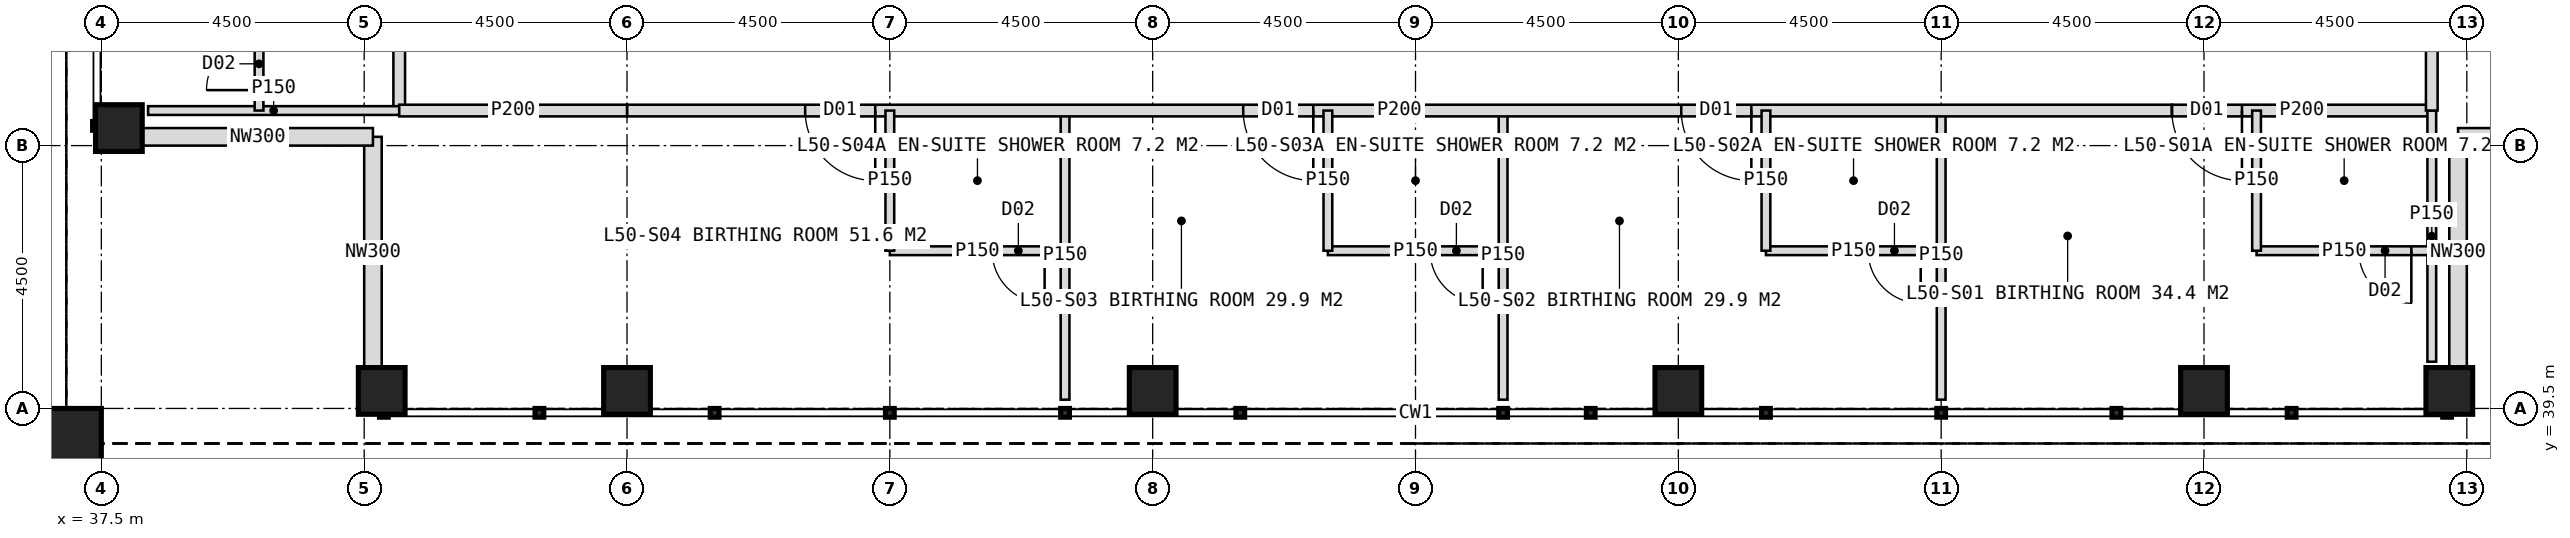
"""IFC4 building model, lengths in metres.
Left out: names, types, materials, properties, quantities, classifications, styles, units other than length and angle.
Written with IfcOpenShell. Run it as: python <this file> out.ifc"""

import sys

from ifc_helpers import new_model, si_unit, direction, frame, frame_2d, origin, origin_2d, place, context, subcontext, project, spatial, rectangle, hollow_rectangle, extrude, element, fill, save


model = new_model("IFC4")
c1 = context("Model", 3, precision=1e-05, world=origin(), true_north=direction((0.0, 1.0)))
c2 = subcontext(c1, "Body", "Model", "MODEL_VIEW")
j1 = project(units=[si_unit("LENGTHUNIT", "METRE"), si_unit("PLANEANGLEUNIT", "RADIAN")], contexts=[c1])
p1 = place(None, origin())
s1 = spatial("IfcSite", under=j1, at=p1, CompositionType="ELEMENT")
p2 = place(p1, origin())
s2 = spatial("IfcBuilding", under=s1, at=p2, CompositionType="ELEMENT")
p3 = place(p2, frame((0.0, 0.0, 209.0)))
s3 = spatial("IfcBuildingStorey", under=s2, at=p3, CompositionType="ELEMENT", Elevation=209.0)
for number, where, z_axis, x_axis in (
    (1, (42.3, 39.8, 0.0), (0.0, 0.0, 1.0), (1.0, 0.0, 0.0)),
    (2, (37.8, 44.3, 0.0), (0.0, 0.0, 1.0), (1.0, 0.0, 0.0)),
    (3, (46.5, 39.8, 0.0), (0.0, 0.0, 1.0), (1.0, 0.0, 0.0)),
    (4, (55.5, 39.8, 0.0), (0.0, 0.0, 1.0), (1.0, 0.0, 0.0)),
    (5, (64.5, 39.8, 0.0), (0.0, 0.0, 1.0), (1.0, 0.0, 0.0)),
    (6, (73.5, 39.8, 0.0), (0.0, 0.0, 1.0), (1.0, 0.0, 0.0)),
    (7, (77.7, 39.8, 0.0), (0.0, 0.0, 1.0), (1.0, 0.0, 0.0)),
):
    element("IfcColumn", number, at=place(p3, frame(where, z_axis=z_axis, x_axis=x_axis)), inside=s3, PredefinedType="COLUMN", context=c2, shape_type="SweptSolid", body=[
        extrude(hollow_rectangle(XDim=0.8, YDim=0.8, WallThickness=0.08, at=origin_2d()), origin(), (0.0, 0.0, 1.0), 4.0),
    ])
p4 = place(p3, frame((36.9, 38.9, 0.0), z_axis=(0.0, 0.0, 1.0), x_axis=(1.0, 0.0, 0.0)))
e8 = element("IfcColumn", 8, at=p4, inside=s3, PredefinedType="COLUMN", context=c2, shape_type="SweptSolid", body=[
    extrude(hollow_rectangle(XDim=1.2, YDim=1.2, WallThickness=0.07, at=origin_2d()), origin(), (0.0, 0.0, 1.0), 4.0),
])
for number, where, z_axis, x_axis in (
    (9, (42.15, 40.2, 0.0), (0.0, 0.0, 1.0), (0.0, 1.0, 0.0)),
    (10, (42.15, 44.15, 0.0), (0.0, 0.0, 1.0), (-1.0, 0.0, 0.0)),
    (11, (81.8, 44.15, 0.0), (0.0, 0.0, 1.0), (-1.0, 0.0, 0.0)),
    (12, (77.85, 44.15, 0.0), (0.0, 0.0, 1.0), (0.0, -1.0, 0.0)),
):
    element("IfcWall", number, at=place(p3, frame(where, z_axis=z_axis, x_axis=x_axis)), inside=s3, PredefinedType="ELEMENTEDWALL", context=c2, shape_type="SweptSolid", body=[
        extrude(rectangle(XDim=3.95, YDim=0.3, at=frame_2d((1.975, 0.0))), origin(), (0.0, 0.0, 1.0), 2.85),
    ])
p5 = place(p3, frame((42.6, 44.6, 0.0), z_axis=(0.0, 0.0, 1.0), x_axis=(0.0, 1.0, 0.0)))
e13 = element("IfcWall", 13, at=p5, inside=s3, PredefinedType="PARTITIONING", context=c2, shape_type="SweptSolid", body=[
    extrude(rectangle(XDim=4.45, YDim=0.2, at=frame_2d((2.225, 0.0))), origin(), (0.0, 0.0, 1.0), 2.85),
])
p6 = place(p5, frame((3.25, 0.0, 0.0)))
e14 = element("IfcOpeningElement", 14, at=p6, cuts=e13, PredefinedType="OPENING", context=c2, shape_type="SweptSolid", body=[
    extrude(rectangle(XDim=1.2, YDim=2.2, at=frame_2d((0.6, 1.1))), frame((0.0, 0.11, 0.0), z_axis=(0.0, -1.0, 0.0), x_axis=(1.0, 0.0, 0.0)), (0.0, 0.0, 1.0), 0.22),
])
p7 = place(p3, frame((42.6, 44.6, 0.0), z_axis=(0.0, 0.0, 1.0), x_axis=(-1.0, 0.0, 0.0)))
e15 = element("IfcWall", 15, at=p7, inside=s3, PredefinedType="PARTITIONING", context=c2, shape_type="SweptSolid", body=[
    extrude(rectangle(XDim=4.3, YDim=0.15, at=frame_2d((2.15, 0.0))), origin(), (0.0, 0.0, 1.0), 2.85),
])
p8 = place(p3, frame((40.2, 44.6, 0.0), z_axis=(0.0, 0.0, 1.0), x_axis=(0.0, 1.0, 0.0)))
e16 = element("IfcWall", 16, at=p8, inside=s3, PredefinedType="PARTITIONING", context=c2, shape_type="SweptSolid", body=[
    extrude(rectangle(XDim=3.0, YDim=0.15, at=frame_2d((1.5, 0.0))), origin(), (0.0, 0.0, 1.0), 3.75),
])
p9 = place(p8, frame((0.35, 0.0, 0.0)))
e17 = element("IfcOpeningElement", 17, at=p9, cuts=e16, PredefinedType="OPENING", context=c2, shape_type="SweptSolid", body=[
    extrude(rectangle(XDim=0.9, YDim=2.1, at=frame_2d((0.45, 1.05))), frame((0.0, 0.085, 0.0), z_axis=(0.0, -1.0, 0.0), x_axis=(1.0, 0.0, 0.0)), (0.0, 0.0, 1.0), 0.17),
])
for number, where, z_axis, x_axis in (
    (18, (69.0, 44.6, 0.0), (0.0, 0.0, 1.0), (0.0, -1.0, 0.0)),
    (19, (61.5, 44.6, 0.0), (0.0, 0.0, 1.0), (0.0, -1.0, 0.0)),
    (20, (54.0, 44.6, 0.0), (0.0, 0.0, 1.0), (0.0, -1.0, 0.0)),
):
    element("IfcWall", number, at=place(p3, frame(where, z_axis=z_axis, x_axis=x_axis)), inside=s3, PredefinedType="PARTITIONING", context=c2, shape_type="SweptSolid", body=[
        extrude(rectangle(XDim=4.95, YDim=0.15, at=frame_2d((2.475, 0.0))), origin(), (0.0, 0.0, 1.0), 3.75),
    ])
p10 = place(p3, frame((77.4, 44.6, 0.0), z_axis=(0.0, 0.0, 1.0), x_axis=(-1.0, 0.0, 0.0)))
e21 = element("IfcWall", 21, at=p10, inside=s3, PredefinedType="PARTITIONING", context=c2, shape_type="SweptSolid", body=[
    extrude(rectangle(XDim=4.45, YDim=0.2, at=frame_2d((2.225, 0.0))), origin(), (0.0, 0.0, 1.0), 2.85),
])
p11 = place(p10, frame((3.25, 0.0, 0.0)))
e22 = element("IfcOpeningElement", 22, at=p11, cuts=e21, PredefinedType="OPENING", context=c2, shape_type="SweptSolid", body=[
    extrude(rectangle(XDim=1.2, YDim=2.2, at=frame_2d((0.6, 1.1))), frame((0.0, 0.11, 0.0), z_axis=(0.0, -1.0, 0.0), x_axis=(1.0, 0.0, 0.0)), (0.0, 0.0, 1.0), 0.22),
])
p12 = place(p3, frame((72.95, 44.6, 0.0), z_axis=(0.0, 0.0, 1.0), x_axis=(-1.0, 0.0, 0.0)))
e23 = element("IfcWall", 23, at=p12, inside=s3, PredefinedType="PARTITIONING", context=c2, shape_type="SweptSolid", body=[
    extrude(rectangle(XDim=26.45, YDim=0.2, at=frame_2d((13.225, 0.0))), origin(), (0.0, 0.0, 1.0), 3.75),
])
p13 = place(p12, frame((7.2, 0.0, 0.0)))
e24 = element("IfcOpeningElement", 24, at=p13, cuts=e23, PredefinedType="OPENING", context=c2, shape_type="SweptSolid", body=[
    extrude(rectangle(XDim=1.2, YDim=2.2, at=frame_2d((0.6, 1.1))), frame((0.0, 0.11, 0.0), z_axis=(0.0, -1.0, 0.0), x_axis=(1.0, 0.0, 0.0)), (0.0, 0.0, 1.0), 0.22),
])
p14 = place(p12, frame((14.7, 0.0, 0.0)))
e25 = element("IfcOpeningElement", 25, at=p14, cuts=e23, PredefinedType="OPENING", context=c2, shape_type="SweptSolid", body=[
    extrude(rectangle(XDim=1.2, YDim=2.2, at=frame_2d((0.6, 1.1))), frame((0.0, 0.11, 0.0), z_axis=(0.0, -1.0, 0.0), x_axis=(1.0, 0.0, 0.0)), (0.0, 0.0, 1.0), 0.22),
])
p15 = place(p12, frame((22.2, 0.0, 0.0)))
e26 = element("IfcOpeningElement", 26, at=p15, cuts=e23, PredefinedType="OPENING", context=c2, shape_type="SweptSolid", body=[
    extrude(rectangle(XDim=1.2, YDim=2.2, at=frame_2d((0.6, 1.1))), frame((0.0, 0.11, 0.0), z_axis=(0.0, -1.0, 0.0), x_axis=(1.0, 0.0, 0.0)), (0.0, 0.0, 1.0), 0.22),
])
p16 = place(p3, frame((46.5, 44.6, 0.0), z_axis=(0.0, 0.0, 1.0), x_axis=(-1.0, 0.0, 0.0)))
e27 = element("IfcWall", 27, at=p16, inside=s3, PredefinedType="PARTITIONING", context=c2, shape_type="SweptSolid", body=[
    extrude(rectangle(XDim=3.9, YDim=0.2, at=frame_2d((1.95, 0.0))), origin(), (0.0, 0.0, 1.0), 2.85),
])
p17 = place(p3, frame((77.4, 44.6, 0.0), z_axis=(0.0, 0.0, 1.0), x_axis=(0.0, -1.0, 0.0)))
e28 = element("IfcWall", 28, at=p17, inside=s3, PredefinedType="PARTITIONING", context=c2, shape_type="SweptSolid", body=[
    extrude(rectangle(XDim=4.3, YDim=0.15, at=frame_2d((2.15, 0.0))), origin(), (0.0, 0.0, 1.0), 2.85),
])
p18 = place(p3, frame((77.4, 42.2, 0.0), z_axis=(0.0, 0.0, 1.0), x_axis=(-1.0, 0.0, 0.0)))
e29 = element("IfcWall", 29, at=p18, inside=s3, PredefinedType="PARTITIONING", context=c2, shape_type="SweptSolid", body=[
    extrude(rectangle(XDim=3.0, YDim=0.15, at=frame_2d((1.5, 0.0))), origin(), (0.0, 0.0, 1.0), 3.75),
])
p19 = place(p18, frame((0.35, 0.0, 0.0)))
e30 = element("IfcOpeningElement", 30, at=p19, cuts=e29, PredefinedType="OPENING", context=c2, shape_type="SweptSolid", body=[
    extrude(rectangle(XDim=0.9, YDim=2.1, at=frame_2d((0.45, 1.05))), frame((0.0, 0.085, 0.0), z_axis=(0.0, -1.0, 0.0), x_axis=(1.0, 0.0, 0.0)), (0.0, 0.0, 1.0), 0.17),
])
p20 = place(p3, frame((74.4, 44.6, 0.0), z_axis=(0.0, 0.0, 1.0), x_axis=(0.0, -1.0, 0.0)))
e31 = element("IfcWall", 31, at=p20, inside=s3, PredefinedType="PARTITIONING", context=c2, shape_type="SweptSolid", body=[
    extrude(rectangle(XDim=2.4, YDim=0.15, at=frame_2d((1.2, 0.0))), origin(), (0.0, 0.0, 1.0), 3.75),
])
p21 = place(p3, frame((69.0, 42.2, 0.0), z_axis=(0.0, 0.0, 1.0), x_axis=(-1.0, 0.0, 0.0)))
e32 = element("IfcWall", 32, at=p21, inside=s3, PredefinedType="PARTITIONING", context=c2, shape_type="SweptSolid", body=[
    extrude(rectangle(XDim=3.0, YDim=0.15, at=frame_2d((1.5, 0.0))), origin(), (0.0, 0.0, 1.0), 3.75),
])
p22 = place(p21, frame((0.35, 0.0, 0.0)))
e33 = element("IfcOpeningElement", 33, at=p22, cuts=e32, PredefinedType="OPENING", context=c2, shape_type="SweptSolid", body=[
    extrude(rectangle(XDim=0.9, YDim=2.1, at=frame_2d((0.45, 1.05))), frame((0.0, 0.085, 0.0), z_axis=(0.0, -1.0, 0.0), x_axis=(1.0, 0.0, 0.0)), (0.0, 0.0, 1.0), 0.17),
])
p23 = place(p3, frame((66.0, 44.6, 0.0), z_axis=(0.0, 0.0, 1.0), x_axis=(0.0, -1.0, 0.0)))
e34 = element("IfcWall", 34, at=p23, inside=s3, PredefinedType="PARTITIONING", context=c2, shape_type="SweptSolid", body=[
    extrude(rectangle(XDim=2.4, YDim=0.15, at=frame_2d((1.2, 0.0))), origin(), (0.0, 0.0, 1.0), 3.75),
])
p24 = place(p3, frame((61.5, 42.2, 0.0), z_axis=(0.0, 0.0, 1.0), x_axis=(-1.0, 0.0, 0.0)))
e35 = element("IfcWall", 35, at=p24, inside=s3, PredefinedType="PARTITIONING", context=c2, shape_type="SweptSolid", body=[
    extrude(rectangle(XDim=3.0, YDim=0.15, at=frame_2d((1.5, 0.0))), origin(), (0.0, 0.0, 1.0), 3.75),
])
p25 = place(p24, frame((0.35, 0.0, 0.0)))
e36 = element("IfcOpeningElement", 36, at=p25, cuts=e35, PredefinedType="OPENING", context=c2, shape_type="SweptSolid", body=[
    extrude(rectangle(XDim=0.9, YDim=2.1, at=frame_2d((0.45, 1.05))), frame((0.0, 0.085, 0.0), z_axis=(0.0, -1.0, 0.0), x_axis=(1.0, 0.0, 0.0)), (0.0, 0.0, 1.0), 0.17),
])
p26 = place(p3, frame((58.5, 44.6, 0.0), z_axis=(0.0, 0.0, 1.0), x_axis=(0.0, -1.0, 0.0)))
e37 = element("IfcWall", 37, at=p26, inside=s3, PredefinedType="PARTITIONING", context=c2, shape_type="SweptSolid", body=[
    extrude(rectangle(XDim=2.4, YDim=0.15, at=frame_2d((1.2, 0.0))), origin(), (0.0, 0.0, 1.0), 3.75),
])
p27 = place(p3, frame((54.0, 42.2, 0.0), z_axis=(0.0, 0.0, 1.0), x_axis=(-1.0, 0.0, 0.0)))
e38 = element("IfcWall", 38, at=p27, inside=s3, PredefinedType="PARTITIONING", context=c2, shape_type="SweptSolid", body=[
    extrude(rectangle(XDim=3.0, YDim=0.15, at=frame_2d((1.5, 0.0))), origin(), (0.0, 0.0, 1.0), 3.75),
])
p28 = place(p27, frame((0.35, 0.0, 0.0)))
e39 = element("IfcOpeningElement", 39, at=p28, cuts=e38, PredefinedType="OPENING", context=c2, shape_type="SweptSolid", body=[
    extrude(rectangle(XDim=0.9, YDim=2.1, at=frame_2d((0.45, 1.05))), frame((0.0, 0.085, 0.0), z_axis=(0.0, -1.0, 0.0), x_axis=(1.0, 0.0, 0.0)), (0.0, 0.0, 1.0), 0.17),
])
p29 = place(p3, frame((51.0, 44.6, 0.0), z_axis=(0.0, 0.0, 1.0), x_axis=(0.0, -1.0, 0.0)))
e40 = element("IfcWall", 40, at=p29, inside=s3, PredefinedType="PARTITIONING", context=c2, shape_type="SweptSolid", body=[
    extrude(rectangle(XDim=2.4, YDim=0.15, at=frame_2d((1.2, 0.0))), origin(), (0.0, 0.0, 1.0), 3.75),
])
p30 = place(p3, frame((77.4, 48.5, 0.0), z_axis=(0.0, 0.0, 1.0), x_axis=(0.0, -1.0, 0.0)))
e41 = element("IfcWall", 41, at=p30, inside=s3, PredefinedType="PARTITIONING", context=c2, shape_type="SweptSolid", body=[
    extrude(rectangle(XDim=3.9, YDim=0.2, at=frame_2d((1.95, 0.0))), origin(), (0.0, 0.0, 1.0), 2.85),
])
p31 = place(p9, origin())
e42 = element("IfcDoor", 42, at=p31, inside=s3, OperationType="SINGLE_SWING_LEFT", PredefinedType="DOOR", context=c2, shape_type="SweptSolid", body=[
    extrude(rectangle(XDim=0.9, YDim=2.1, at=frame_2d((0.45, 1.05))), frame((0.0, 0.025, 0.0), z_axis=(0.0, -1.0, 0.0), x_axis=(1.0, 0.0, 0.0)), (0.0, 0.0, 1.0), 0.05),
])
fill(e17, e42)
p32 = place(p11, origin())
e43 = element("IfcDoor", 43, at=p32, inside=s3, OperationType="SINGLE_SWING_LEFT", PredefinedType="DOOR", context=c2, shape_type="SweptSolid", body=[
    extrude(rectangle(XDim=1.2, YDim=2.2, at=frame_2d((0.6, 1.1))), frame((0.0, 0.025, 0.0), z_axis=(0.0, -1.0, 0.0), x_axis=(1.0, 0.0, 0.0)), (0.0, 0.0, 1.0), 0.05),
])
fill(e22, e43)
p33 = place(p19, origin())
e44 = element("IfcDoor", 44, at=p33, inside=s3, OperationType="SINGLE_SWING_LEFT", PredefinedType="DOOR", context=c2, shape_type="SweptSolid", body=[
    extrude(rectangle(XDim=0.9, YDim=2.1, at=frame_2d((0.45, 1.05))), frame((0.0, 0.025, 0.0), z_axis=(0.0, -1.0, 0.0), x_axis=(1.0, 0.0, 0.0)), (0.0, 0.0, 1.0), 0.05),
])
fill(e30, e44)
p34 = place(p13, origin())
e45 = element("IfcDoor", 45, at=p34, inside=s3, OperationType="SINGLE_SWING_LEFT", PredefinedType="DOOR", context=c2, shape_type="SweptSolid", body=[
    extrude(rectangle(XDim=1.2, YDim=2.2, at=frame_2d((0.6, 1.1))), frame((0.0, 0.025, 0.0), z_axis=(0.0, -1.0, 0.0), x_axis=(1.0, 0.0, 0.0)), (0.0, 0.0, 1.0), 0.05),
])
fill(e24, e45)
p35 = place(p22, origin())
e46 = element("IfcDoor", 46, at=p35, inside=s3, OperationType="SINGLE_SWING_LEFT", PredefinedType="DOOR", context=c2, shape_type="SweptSolid", body=[
    extrude(rectangle(XDim=0.9, YDim=2.1, at=frame_2d((0.45, 1.05))), frame((0.0, 0.025, 0.0), z_axis=(0.0, -1.0, 0.0), x_axis=(1.0, 0.0, 0.0)), (0.0, 0.0, 1.0), 0.05),
])
fill(e33, e46)
p36 = place(p14, origin())
e47 = element("IfcDoor", 47, at=p36, inside=s3, OperationType="SINGLE_SWING_LEFT", PredefinedType="DOOR", context=c2, shape_type="SweptSolid", body=[
    extrude(rectangle(XDim=1.2, YDim=2.2, at=frame_2d((0.6, 1.1))), frame((0.0, 0.025, 0.0), z_axis=(0.0, -1.0, 0.0), x_axis=(1.0, 0.0, 0.0)), (0.0, 0.0, 1.0), 0.05),
])
fill(e25, e47)
p37 = place(p25, origin())
e48 = element("IfcDoor", 48, at=p37, inside=s3, OperationType="SINGLE_SWING_LEFT", PredefinedType="DOOR", context=c2, shape_type="SweptSolid", body=[
    extrude(rectangle(XDim=0.9, YDim=2.1, at=frame_2d((0.45, 1.05))), frame((0.0, 0.025, 0.0), z_axis=(0.0, -1.0, 0.0), x_axis=(1.0, 0.0, 0.0)), (0.0, 0.0, 1.0), 0.05),
])
fill(e36, e48)
p38 = place(p15, origin())
e49 = element("IfcDoor", 49, at=p38, inside=s3, OperationType="SINGLE_SWING_LEFT", PredefinedType="DOOR", context=c2, shape_type="SweptSolid", body=[
    extrude(rectangle(XDim=1.2, YDim=2.2, at=frame_2d((0.6, 1.1))), frame((0.0, 0.025, 0.0), z_axis=(0.0, -1.0, 0.0), x_axis=(1.0, 0.0, 0.0)), (0.0, 0.0, 1.0), 0.05),
])
fill(e26, e49)
p39 = place(p28, origin())
e50 = element("IfcDoor", 50, at=p39, inside=s3, OperationType="SINGLE_SWING_LEFT", PredefinedType="DOOR", context=c2, shape_type="SweptSolid", body=[
    extrude(rectangle(XDim=0.9, YDim=2.1, at=frame_2d((0.45, 1.05))), frame((0.0, 0.025, 0.0), z_axis=(0.0, -1.0, 0.0), x_axis=(1.0, 0.0, 0.0)), (0.0, 0.0, 1.0), 0.05),
])
fill(e39, e50)
save(model, sys.argv[1])
